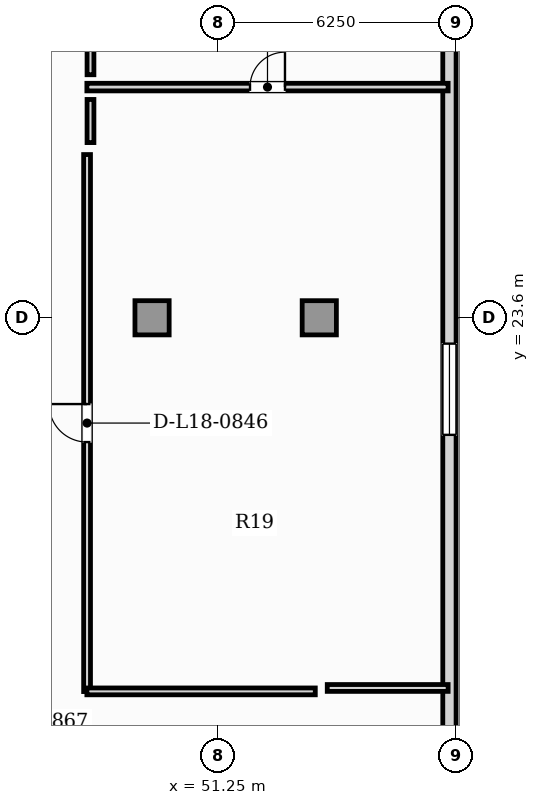
"""IFC4 building model, lengths in metres.
Left out: names, types, materials, properties, quantities, classifications, styles, units other than length and angle.
Written with IfcOpenShell. Run it as: python <this file> out.ifc"""

import sys

from ifc_helpers import new_model, si_unit, direction, frame, frame_2d, origin, origin_2d, place, context, subcontext, project, spatial, rectangle, extrude, element, fill, save


model = new_model("IFC4")
c1 = context("Model", 3, precision=1e-05, world=origin(), true_north=direction((0.0, 1.0)))
c2 = subcontext(c1, "Body", "Model", "MODEL_VIEW")
j1 = project(units=[si_unit("LENGTHUNIT", "METRE"), si_unit("PLANEANGLEUNIT", "RADIAN")], contexts=[c1])
p1 = place(None, origin())
s1 = spatial("IfcSite", under=j1, at=p1, CompositionType="ELEMENT")
p2 = place(p1, origin())
s2 = spatial("IfcBuilding", under=s1, at=p2, CompositionType="ELEMENT")
p3 = place(p2, frame((0.0, 0.0, 76.0)))
s3 = spatial("IfcBuildingStorey", under=s2, at=p3, CompositionType="ELEMENT", Elevation=76.0)
for number, where, z_axis, x_axis in (
    (1, (49.5, 23.6, 0.0), (0.0, 0.0, 1.0), (1.0, 0.0, 0.0)),
    (2, (53.9, 23.6, 0.0), (0.0, 0.0, 1.0), (1.0, 0.0, 0.0)),
):
    element("IfcColumn", number, at=place(p3, frame(where, z_axis=z_axis, x_axis=x_axis)), inside=s3, PredefinedType="COLUMN", context=c2, shape_type="SweptSolid", body=[
        extrude(rectangle(XDim=0.9, YDim=0.9, at=origin_2d()), origin(), (0.0, 0.0, 1.0), 5.05),
    ])
p4 = place(p3, frame((57.325, 3.24, 0.0), z_axis=(0.0, 0.0, 1.0), x_axis=(0.0, 1.0, 0.0)))
e3 = element("IfcWall", 3, at=p4, inside=s3, PredefinedType="SOLIDWALL", context=c2, shape_type="SweptSolid", body=[
    extrude(rectangle(XDim=39.92, YDim=0.35, at=frame_2d((19.96, 0.0))), origin(), (0.0, 0.0, 1.0), 4.8),
])
p5 = place(p4, frame((17.28, 0.0, 0.85)))
e4 = element("IfcOpeningElement", 4, at=p5, cuts=e3, PredefinedType="OPENING", context=c2, shape_type="SweptSolid", body=[
    extrude(rectangle(XDim=2.4, YDim=2.0, at=frame_2d((1.2, 1.0))), frame((0.0, 0.185, 0.0), z_axis=(0.0, -1.0, 0.0), x_axis=(1.0, 0.0, 0.0)), (0.0, 0.0, 1.0), 0.37),
])
p6 = place(p4, frame((31.308, 0.0, 0.85)))
e5 = element("IfcOpeningElement", 5, at=p6, cuts=e3, PredefinedType="OPENING", context=c2, shape_type="SweptSolid", body=[
    extrude(rectangle(XDim=2.4, YDim=2.0, at=frame_2d((1.2, 1.0))), frame((0.0, 0.185, 0.0), z_axis=(0.0, -1.0, 0.0), x_axis=(1.0, 0.0, 0.0)), (0.0, 0.0, 1.0), 0.37),
])
p7 = place(p3, frame((47.79, 13.765, 0.0), z_axis=(0.0, 0.0, 1.0), x_axis=(0.0, 1.0, 0.0)))
e6 = element("IfcWall", 6, at=p7, inside=s3, PredefinedType="PARTITIONING", context=c2, shape_type="SweptSolid", body=[
    extrude(rectangle(XDim=14.13, YDim=0.18, at=frame_2d((7.065, 0.0))), origin(), (0.0, 0.0, 1.0), 4.8),
])
p8 = place(p7, frame((6.565, 0.0, 0.0)))
e7 = element("IfcOpeningElement", 7, at=p8, cuts=e6, PredefinedType="OPENING", context=c2, shape_type="SweptSolid", body=[
    extrude(rectangle(XDim=1.0, YDim=2.15, at=frame_2d((0.5, 1.075))), frame((0.0, 0.1, 0.0), z_axis=(0.0, -1.0, 0.0), x_axis=(1.0, 0.0, 0.0)), (0.0, 0.0, 1.0), 0.2),
])
p9 = place(p3, frame((47.785, 13.77, 0.0), z_axis=(0.0, 0.0, 1.0), x_axis=(1.0, 0.0, 0.0)))
e8 = element("IfcWall", 8, at=p9, inside=s3, PredefinedType="PARTITIONING", context=c2, shape_type="SweptSolid", body=[
    extrude(rectangle(XDim=6.01, YDim=0.18, at=frame_2d((3.005, 0.0))), origin(), (0.0, 0.0, 1.0), 4.8),
])
p10 = place(p3, frame((47.785, 29.67, 0.0), z_axis=(0.0, 0.0, 1.0), x_axis=(1.0, 0.0, 0.0)))
e9 = element("IfcWall", 9, at=p10, inside=s3, PredefinedType="PARTITIONING", context=c2, shape_type="SweptSolid", body=[
    extrude(rectangle(XDim=9.505, YDim=0.2, at=frame_2d((4.752, 0.0))), origin(), (0.0, 0.0, 1.0), 4.8),
])
p11 = place(p10, frame((4.292, 0.0, 0.0)))
e10 = element("IfcOpeningElement", 10, at=p11, cuts=e9, PredefinedType="OPENING", context=c2, shape_type="SweptSolid", body=[
    extrude(rectangle(XDim=0.92, YDim=2.1, at=frame_2d((0.46, 1.05))), frame((0.0, 0.11, 0.0), z_axis=(0.0, -1.0, 0.0), x_axis=(1.0, 0.0, 0.0)), (0.0, 0.0, 1.0), 0.22),
])
p12 = place(p3, frame((47.88, 28.21, 0.0), z_axis=(0.0, 0.0, 1.0), x_axis=(0.0, 1.0, 0.0)))
e11 = element("IfcWall", 11, at=p12, inside=s3, PredefinedType="PARTITIONING", context=c2, shape_type="SweptSolid", body=[
    extrude(rectangle(XDim=1.135, YDim=0.18, at=frame_2d((0.567, 0.0))), origin(), (0.0, 0.0, 1.0), 4.8),
])
p13 = place(p3, frame((57.29, 13.86, 0.0), z_axis=(0.0, 0.0, 1.0), x_axis=(-1.0, 0.0, 0.0)))
e12 = element("IfcWall", 12, at=p13, inside=s3, PredefinedType="PARTITIONING", context=c2, shape_type="SweptSolid", body=[
    extrude(rectangle(XDim=3.18, YDim=0.18, at=frame_2d((1.59, 0.0))), origin(), (0.0, 0.0, 1.0), 4.8),
])
p14 = place(p3, frame((47.88, 29.995, 0.0), z_axis=(0.0, 0.0, 1.0), x_axis=(0.0, 1.0, 0.0)))
e13 = element("IfcWall", 13, at=p14, inside=s3, PredefinedType="PARTITIONING", context=c2, shape_type="SweptSolid", body=[
    extrude(rectangle(XDim=16.195, YDim=0.18, at=frame_2d((8.097, 0.0))), origin(), (0.0, 0.0, 1.0), 4.8),
])
p15 = place(p5, origin())
e14 = element("IfcWindow", 14, at=p15, inside=s3, PartitioningType="SINGLE_PANEL", PredefinedType="WINDOW", context=c2, shape_type="SweptSolid", body=[
    extrude(rectangle(XDim=2.4, YDim=2.0, at=frame_2d((1.2, 1.0))), frame((0.0, 0.03, 0.0), z_axis=(0.0, -1.0, 0.0), x_axis=(1.0, 0.0, 0.0)), (0.0, 0.0, 1.0), 0.06),
])
fill(e4, e14)
p16 = place(p8, origin())
e15 = element("IfcDoor", 15, at=p16, inside=s3, OperationType="SINGLE_SWING_RIGHT", PredefinedType="DOOR", context=c2, shape_type="SweptSolid", body=[
    extrude(rectangle(XDim=1.0, YDim=2.15, at=frame_2d((0.5, 1.075))), frame((0.0, 0.025, 0.0), z_axis=(0.0, -1.0, 0.0), x_axis=(1.0, 0.0, 0.0)), (0.0, 0.0, 1.0), 0.05),
])
fill(e7, e15)
p17 = place(p11, origin())
e16 = element("IfcDoor", 16, at=p17, inside=s3, OperationType="SINGLE_SWING_RIGHT", PredefinedType="DOOR", context=c2, shape_type="SweptSolid", body=[
    extrude(rectangle(XDim=0.92, YDim=2.1, at=frame_2d((0.46, 1.05))), frame((0.0, 0.025, 0.0), z_axis=(0.0, -1.0, 0.0), x_axis=(1.0, 0.0, 0.0)), (0.0, 0.0, 1.0), 0.05),
])
fill(e10, e16)
save(model, sys.argv[1])
